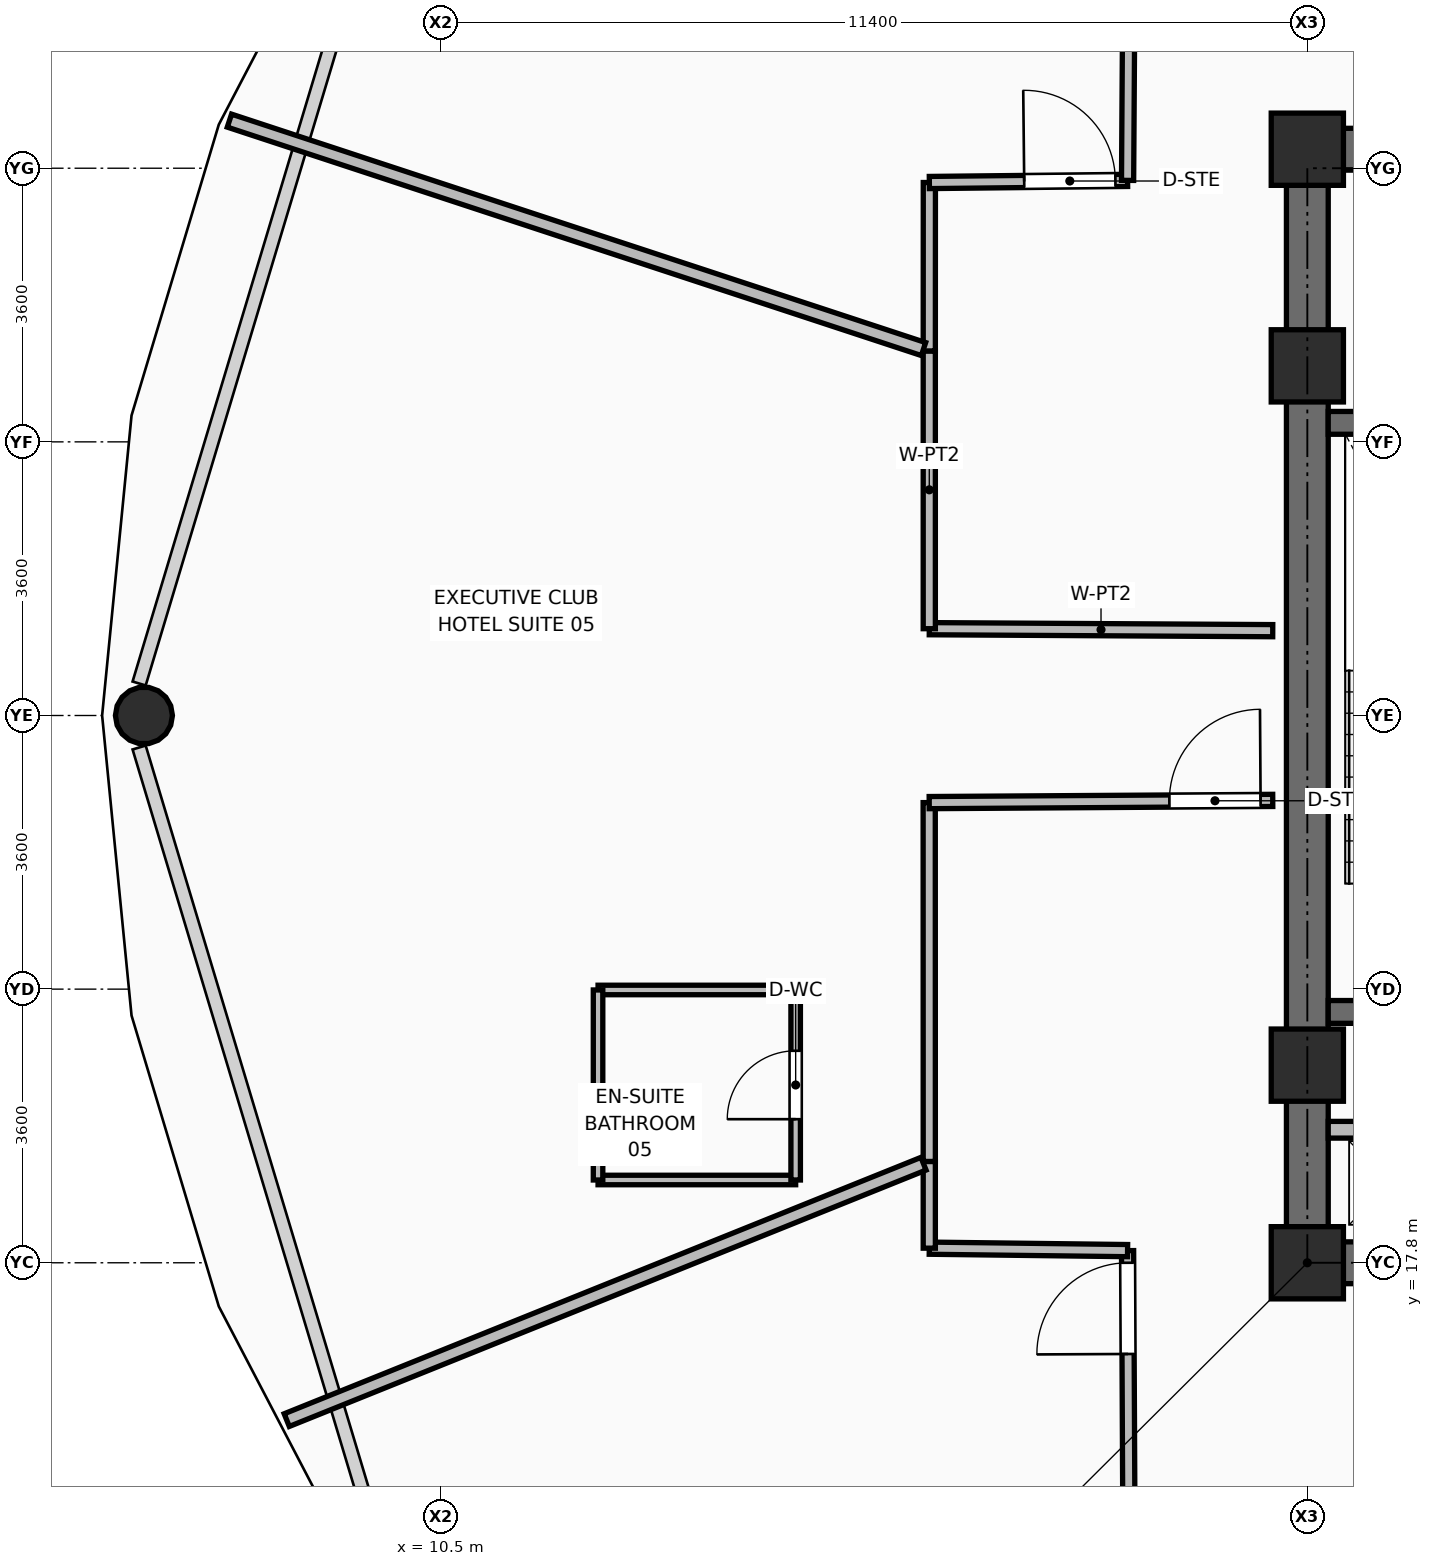
"""IFC4 building model, lengths in metres.
Left out: names, types, materials, properties, quantities, classifications, styles, units other than length and angle.
Written with IfcOpenShell. Run it as: python <this file> out.ifc"""

import sys

from ifc_helpers import new_model, si_unit, direction, frame, frame_2d, origin, origin_2d, place, context, subcontext, project, spatial, rectangle, hollow_circle, extrude, element, fill, save


model = new_model("IFC4")
c1 = context("Model", 3, precision=1e-05, world=origin(), true_north=direction((0.0, 1.0)))
c2 = subcontext(c1, "Body", "Model", "MODEL_VIEW")
j1 = project(units=[si_unit("LENGTHUNIT", "METRE"), si_unit("PLANEANGLEUNIT", "RADIAN")], contexts=[c1])
p1 = place(None, origin())
s1 = spatial("IfcSite", under=j1, at=p1, CompositionType="ELEMENT")
p2 = place(p1, origin())
s2 = spatial("IfcBuilding", under=s1, at=p2, CompositionType="ELEMENT")
p3 = place(p2, frame((0.0, 0.0, 142.2)))
s3 = spatial("IfcBuildingStorey", under=s2, at=p3, CompositionType="ELEMENT", Elevation=142.2)
for number, where, z_axis, x_axis in (
    (1, (21.9, 17.8, 0.0), (0.0, 0.0, 1.0), (1.0, 0.0, 0.0)),
    (2, (21.9, 20.4, 0.0), (0.0, 0.0, 1.0), (1.0, 0.0, 0.0)),
    (3, (21.9, 29.6, 0.0), (0.0, 0.0, 1.0), (1.0, 0.0, 0.0)),
    (4, (21.9, 32.45, 0.0), (0.0, 0.0, 1.0), (1.0, 0.0, 0.0)),
):
    element("IfcColumn", number, at=place(p3, frame(where, z_axis=z_axis, x_axis=x_axis)), inside=s3, PredefinedType="COLUMN", context=c2, shape_type="SweptSolid", body=[
        extrude(rectangle(XDim=0.95, YDim=0.95, at=origin_2d()), origin(), (0.0, 0.0, 1.0), 3.75),
    ])
p4 = place(p3, frame((6.593, 25.0, 0.0), z_axis=(0.017367276966, 0.0, 0.999849177472), x_axis=(0.0, 1.0, 0.0)))
e5 = element("IfcColumn", 5, at=p4, inside=s3, PredefinedType="COLUMN", context=c2, shape_type="SweptSolid", body=[
    extrude(hollow_circle(Radius=0.375, WallThickness=0.035, at=origin_2d()), origin(), (0.0, 0.0, 1.0), 3.571),
])
p5 = place(p3, frame((21.625, 17.8, 0.0), z_axis=(0.0, 0.0, 1.0), x_axis=(1.0, 0.0, 0.0)))
e6 = element("IfcWall", 6, at=p5, inside=s3, PredefinedType="SHEAR", context=c2, shape_type="SweptSolid", body=[
    extrude(rectangle(XDim=2.125, YDim=0.55, at=frame_2d((1.062, 0.0))), origin(), (0.0, 0.0, 1.0), 3.57),
])
p6 = place(p3, frame((21.625, 32.45, 0.0), z_axis=(0.0, 0.0, 1.0), x_axis=(1.0, 0.0, 0.0)))
e7 = element("IfcWall", 7, at=p6, inside=s3, PredefinedType="SHEAR", context=c2, shape_type="SweptSolid", body=[
    extrude(rectangle(XDim=19.75, YDim=0.55, at=frame_2d((9.875, 0.0))), origin(), (0.0, 0.0, 1.0), 3.57),
])
p7 = place(p6, frame((2.125, 0.0, 0.0)))
e8 = element("IfcOpeningElement", 8, at=p7, cuts=e7, PredefinedType="OPENING", context=c2, shape_type="SweptSolid", body=[
    extrude(rectangle(XDim=1.1, YDim=2.1, at=frame_2d((0.55, 1.05))), frame((0.0, 0.285, 0.0), z_axis=(0.0, -1.0, 0.0), x_axis=(1.0, 0.0, 0.0)), (0.0, 0.0, 1.0), 0.57),
])
p8 = place(p6, frame((15.515, 0.0, 0.0)))
e9 = element("IfcOpeningElement", 9, at=p8, cuts=e7, PredefinedType="OPENING", context=c2, shape_type="SweptSolid", body=[
    extrude(rectangle(XDim=1.0, YDim=2.1, at=frame_2d((0.5, 1.05))), frame((0.0, 0.285, 0.0), z_axis=(0.0, -1.0, 0.0), x_axis=(1.0, 0.0, 0.0)), (0.0, 0.0, 1.0), 0.57),
])
p9 = place(p6, frame((17.525, 0.0, 0.0)))
e10 = element("IfcOpeningElement", 10, at=p9, cuts=e7, PredefinedType="OPENING", context=c2, shape_type="SweptSolid", body=[
    extrude(rectangle(XDim=0.9, YDim=2.1, at=frame_2d((0.45, 1.05))), frame((0.0, 0.285, 0.0), z_axis=(0.0, -1.0, 0.0), x_axis=(1.0, 0.0, 0.0)), (0.0, 0.0, 1.0), 0.57),
])
p10 = place(p3, frame((21.9, 18.075, 0.0), z_axis=(0.0, 0.0, 1.0), x_axis=(0.0, 1.0, 0.0)))
e11 = element("IfcWall", 11, at=p10, inside=s3, PredefinedType="SHEAR", context=c2, shape_type="SweptSolid", body=[
    extrude(rectangle(XDim=14.1, YDim=0.55, at=frame_2d((7.05, 0.0))), origin(), (0.0, 0.0, 1.0), 3.57),
])
p11 = place(p3, frame((22.175, 21.1, 0.0), z_axis=(0.0, 0.0, 1.0), x_axis=(1.0, 0.0, 0.0)))
e12 = element("IfcWall", 12, at=p11, inside=s3, PredefinedType="SHEAR", context=c2, shape_type="SweptSolid", body=[
    extrude(rectangle(XDim=3.565, YDim=0.3, at=frame_2d((1.782, 0.0))), origin(), (0.0, 0.0, 1.0), 3.57),
])
p12 = place(p11, frame((2.045, 0.0, 0.0)))
e13 = element("IfcOpeningElement", 13, at=p12, cuts=e12, PredefinedType="OPENING", context=c2, shape_type="SweptSolid", body=[
    extrude(rectangle(XDim=1.05, YDim=2.1, at=frame_2d((0.525, 1.05))), frame((0.0, 0.16, 0.0), z_axis=(0.0, -1.0, 0.0), x_axis=(1.0, 0.0, 0.0)), (0.0, 0.0, 1.0), 0.32),
])
p13 = place(p3, frame((22.175, 28.85, 0.0), z_axis=(0.0, 0.0, 1.0), x_axis=(1.0, 0.0, 0.0)))
e14 = element("IfcWall", 14, at=p13, inside=s3, PredefinedType="SHEAR", context=c2, shape_type="SweptSolid", body=[
    extrude(rectangle(XDim=3.565, YDim=0.3, at=frame_2d((1.782, 0.0))), origin(), (0.0, 0.0, 1.0), 3.57),
])
p14 = place(p3, frame((22.175, 19.55, 0.0), z_axis=(0.0, 0.0, 1.0), x_axis=(1.0, 0.0, 0.0)))
e15 = element("IfcWall", 15, at=p14, inside=s3, PredefinedType="PARTITIONING", context=c2, shape_type="SweptSolid", body=[
    extrude(rectangle(XDim=1.615, YDim=0.22, at=frame_2d((0.808, 0.0))), origin(), (0.0, 0.0, 1.0), 2.595),
])
p15 = place(p3, frame((21.445, 26.116, 0.0), z_axis=(0.0, 0.0, 1.0), x_axis=(-0.999983292409, 0.005780562522, 0.0)))
e16 = element("IfcWall", 16, at=p15, inside=s3, PredefinedType="PARTITIONING", context=c2, shape_type="SweptSolid", body=[
    extrude(rectangle(XDim=4.519, YDim=0.16, at=frame_2d((2.26, 0.0))), origin(), (0.0, 0.0, 1.0), 2.595),
])
p16 = place(p3, frame((16.926, 26.142, 0.0), z_axis=(0.0, 0.0, 1.0), x_axis=(0.0, 1.0, 0.0)))
e17 = element("IfcWall", 17, at=p16, inside=s3, PredefinedType="PARTITIONING", context=c2, shape_type="SweptSolid", body=[
    extrude(rectangle(XDim=3.654, YDim=0.16, at=frame_2d((1.827, 0.0))), origin(), (0.0, 0.0, 1.0), 3.55),
])
p17 = place(p3, frame((16.926, 29.796, 0.0), z_axis=(0.0, 0.0, 1.0), x_axis=(0.000440674189, 0.999999902903, 0.0)))
e18 = element("IfcWall", 18, at=p17, inside=s3, PredefinedType="PARTITIONING", context=c2, shape_type="SweptSolid", body=[
    extrude(rectangle(XDim=2.216, YDim=0.16, at=frame_2d((1.108, 0.0))), origin(), (0.0, 0.0, 1.0), 3.55),
])
p18 = place(p3, frame((16.927, 32.012, 0.0), z_axis=(0.0, 0.0, 1.0), x_axis=(0.99994205409, 0.010765150367, 0.0)))
e19 = element("IfcWall", 19, at=p18, inside=s3, PredefinedType="PARTITIONING", context=c2, shape_type="SweptSolid", body=[
    extrude(rectangle(XDim=2.608, YDim=0.16, at=frame_2d((1.304, 0.0))), origin(), (0.0, 0.0, 1.0), 3.55),
])
p19 = place(p18, frame((1.248, 0.0, 0.0)))
e20 = element("IfcOpeningElement", 20, at=p19, cuts=e19, PredefinedType="OPENING", context=c2, shape_type="SweptSolid", body=[
    extrude(rectangle(XDim=1.2, YDim=2.1, at=frame_2d((0.6, 1.05))), frame((0.0, 0.09, 0.0), z_axis=(0.0, -1.0, 0.0), x_axis=(1.0, 0.0, 0.0)), (0.0, 0.0, 1.0), 0.18),
])
p20 = place(p3, frame((19.535, 32.04, 0.0), z_axis=(0.0, 0.0, 1.0), x_axis=(0.006526585281, 0.999978701615, 0.0)))
e21 = element("IfcWall", 21, at=p20, inside=s3, PredefinedType="PARTITIONING", context=c2, shape_type="SweptSolid", body=[
    extrude(rectangle(XDim=2.768, YDim=0.16, at=frame_2d((1.384, 0.0))), origin(), (0.0, 0.0, 1.0), 3.006),
])
p21 = place(p3, frame((19.555, 13.816, 0.0), z_axis=(0.0, 0.0, 1.0), x_axis=(-0.004830861504, 0.99998833132, 0.0)))
e22 = element("IfcWall", 22, at=p21, inside=s3, PredefinedType="PARTITIONING", context=c2, shape_type="SweptSolid", body=[
    extrude(rectangle(XDim=4.144, YDim=0.16, at=frame_2d((2.072, 0.0))), origin(), (0.0, 0.0, 1.0), 3.006),
])
p22 = place(p21, frame((2.784, 0.0, 0.0)))
e23 = element("IfcOpeningElement", 23, at=p22, cuts=e22, PredefinedType="OPENING", context=c2, shape_type="SweptSolid", body=[
    extrude(rectangle(XDim=1.2, YDim=2.1, at=frame_2d((0.6, 1.05))), frame((0.0, 0.09, 0.0), z_axis=(0.0, -1.0, 0.0), x_axis=(1.0, 0.0, 0.0)), (0.0, 0.0, 1.0), 0.18),
])
p23 = place(p3, frame((19.535, 17.96, 0.0), z_axis=(0.0, 0.0, 1.0), x_axis=(-0.999924866554, 0.012258109444, 0.0)))
e24 = element("IfcWall", 24, at=p23, inside=s3, PredefinedType="PARTITIONING", context=c2, shape_type="SweptSolid", body=[
    extrude(rectangle(XDim=2.609, YDim=0.16, at=frame_2d((1.305, 0.0))), origin(), (0.0, 0.0, 1.0), 3.55),
])
p24 = place(p3, frame((16.926, 17.992, 0.0), z_axis=(0.0, 0.0, 1.0), x_axis=(0.0, 1.0, 0.0)))
e25 = element("IfcWall", 25, at=p24, inside=s3, PredefinedType="PARTITIONING", context=c2, shape_type="SweptSolid", body=[
    extrude(rectangle(XDim=1.141, YDim=0.16, at=frame_2d((0.571, 0.0))), origin(), (0.0, 0.0, 1.0), 3.55),
])
p25 = place(p3, frame((16.926, 19.133, 0.0), z_axis=(0.0, 0.0, 1.0), x_axis=(-0.000206857316, 0.999999978605, 0.0)))
e26 = element("IfcWall", 26, at=p25, inside=s3, PredefinedType="PARTITIONING", context=c2, shape_type="SweptSolid", body=[
    extrude(rectangle(XDim=4.721, YDim=0.16, at=frame_2d((2.36, 0.0))), origin(), (0.0, 0.0, 1.0), 3.006),
])
p26 = place(p3, frame((16.925, 23.854, 0.0), z_axis=(0.0, 0.0, 1.0), x_axis=(0.999979343823, 0.006427435558, 0.0)))
e27 = element("IfcWall", 27, at=p26, inside=s3, PredefinedType="PARTITIONING", context=c2, shape_type="SweptSolid", body=[
    extrude(rectangle(XDim=4.52, YDim=0.16, at=frame_2d((2.26, 0.0))), origin(), (0.0, 0.0, 1.0), 2.595),
])
p27 = place(p26, frame((3.16, 0.0, 0.0)))
e28 = element("IfcOpeningElement", 28, at=p27, cuts=e27, PredefinedType="OPENING", context=c2, shape_type="SweptSolid", body=[
    extrude(rectangle(XDim=1.2, YDim=2.1, at=frame_2d((0.6, 1.05))), frame((0.0, 0.09, 0.0), z_axis=(0.0, -1.0, 0.0), x_axis=(1.0, 0.0, 0.0)), (0.0, 0.0, 1.0), 0.18),
])
p28 = place(p3, frame((16.85, 29.821, 0.0), z_axis=(0.0, 0.0, 1.0), x_axis=(-0.949897717187, 0.312560917074, 0.0)))
e29 = element("IfcWall", 29, at=p28, inside=s3, PredefinedType="PARTITIONING", context=c2, shape_type="SweptSolid", body=[
    extrude(rectangle(XDim=9.614, YDim=0.18, at=frame_2d((4.807, 0.0))), origin(), (0.0, 0.0, 1.0), 2.852),
])
p29 = place(p3, frame((16.85, 19.103, 0.0), z_axis=(0.0, 0.0, 1.0), x_axis=(-0.927642909824, -0.373468381331, 0.0)))
e30 = element("IfcWall", 30, at=p29, inside=s3, PredefinedType="PARTITIONING", context=c2, shape_type="SweptSolid", body=[
    extrude(rectangle(XDim=9.032, YDim=0.18, at=frame_2d((4.516, 0.0))), origin(), (0.0, 0.0, 1.0), 2.852),
])
for number, where, z_axis, x_axis in (
    (31, (12.568, 18.889, 0.0), (0.0, 0.0, 1.0), (1.0, 0.0, 0.0)),
    (32, (12.568, 21.389, 0.0), (0.0, 0.0, 1.0), (1.0, 0.0, 0.0)),
):
    element("IfcWall", number, at=place(p3, frame(where, z_axis=z_axis, x_axis=x_axis)), inside=s3, PredefinedType="PARTITIONING", context=c2, shape_type="SweptSolid", body=[
        extrude(rectangle(XDim=2.6, YDim=0.125, at=frame_2d((1.3, 0.0))), origin(), (0.0, 0.0, 1.0), 3.55),
    ])
p30 = place(p3, frame((12.568, 18.889, 0.0), z_axis=(0.0, 0.0, 1.0), x_axis=(0.0, 1.0, 0.0)))
e33 = element("IfcWall", 33, at=p30, inside=s3, PredefinedType="PARTITIONING", context=c2, shape_type="SweptSolid", body=[
    extrude(rectangle(XDim=2.5, YDim=0.125, at=frame_2d((1.25, 0.0))), origin(), (0.0, 0.0, 1.0), 3.55),
])
p31 = place(p3, frame((15.168, 18.889, 0.0), z_axis=(0.0, 0.0, 1.0), x_axis=(0.0, 1.0, 0.0)))
e34 = element("IfcWall", 34, at=p31, inside=s3, PredefinedType="PARTITIONING", context=c2, shape_type="SweptSolid", body=[
    extrude(rectangle(XDim=2.5, YDim=0.125, at=frame_2d((1.25, 0.0))), origin(), (0.0, 0.0, 1.0), 3.55),
])
p32 = place(p31, frame((0.8, 0.0, 0.0)))
e35 = element("IfcOpeningElement", 35, at=p32, cuts=e34, PredefinedType="OPENING", context=c2, shape_type="SweptSolid", body=[
    extrude(rectangle(XDim=0.9, YDim=2.1, at=frame_2d((0.45, 1.05))), frame((0.0, 0.073, 0.0), z_axis=(0.0, -1.0, 0.0), x_axis=(1.0, 0.0, 0.0)), (0.0, 0.0, 1.0), 0.145),
])
p33 = place(p19, origin())
e36 = element("IfcDoor", 36, at=p33, inside=s3, OperationType="SINGLE_SWING_LEFT", PredefinedType="DOOR", context=c2, shape_type="SweptSolid", body=[
    extrude(rectangle(XDim=1.2, YDim=2.1, at=frame_2d((0.6, 1.05))), frame((0.0, 0.025, 0.0), z_axis=(0.0, -1.0, 0.0), x_axis=(1.0, 0.0, 0.0)), (0.0, 0.0, 1.0), 0.05),
])
fill(e20, e36)
p34 = place(p32, origin())
e37 = element("IfcDoor", 37, at=p34, inside=s3, OperationType="SINGLE_SWING_LEFT", PredefinedType="DOOR", context=c2, shape_type="SweptSolid", body=[
    extrude(rectangle(XDim=0.9, YDim=2.1, at=frame_2d((0.45, 1.05))), frame((0.0, 0.025, 0.0), z_axis=(0.0, -1.0, 0.0), x_axis=(1.0, 0.0, 0.0)), (0.0, 0.0, 1.0), 0.05),
])
fill(e35, e37)
p35 = place(p27, origin())
e38 = element("IfcDoor", 38, at=p35, inside=s3, OperationType="SINGLE_SWING_RIGHT", PredefinedType="DOOR", context=c2, shape_type="SweptSolid", body=[
    extrude(rectangle(XDim=1.2, YDim=2.1, at=frame_2d((0.6, 1.05))), frame((0.0, 0.025, 0.0), z_axis=(0.0, -1.0, 0.0), x_axis=(1.0, 0.0, 0.0)), (0.0, 0.0, 1.0), 0.05),
])
fill(e28, e38)
p36 = place(p22, origin())
e39 = element("IfcDoor", 39, at=p36, inside=s3, OperationType="SINGLE_SWING_LEFT", PredefinedType="DOOR", context=c2, shape_type="SweptSolid", body=[
    extrude(rectangle(XDim=1.2, YDim=2.1, at=frame_2d((0.6, 1.05))), frame((0.0, 0.025, 0.0), z_axis=(0.0, -1.0, 0.0), x_axis=(1.0, 0.0, 0.0)), (0.0, 0.0, 1.0), 0.05),
])
fill(e23, e39)
save(model, sys.argv[1])
